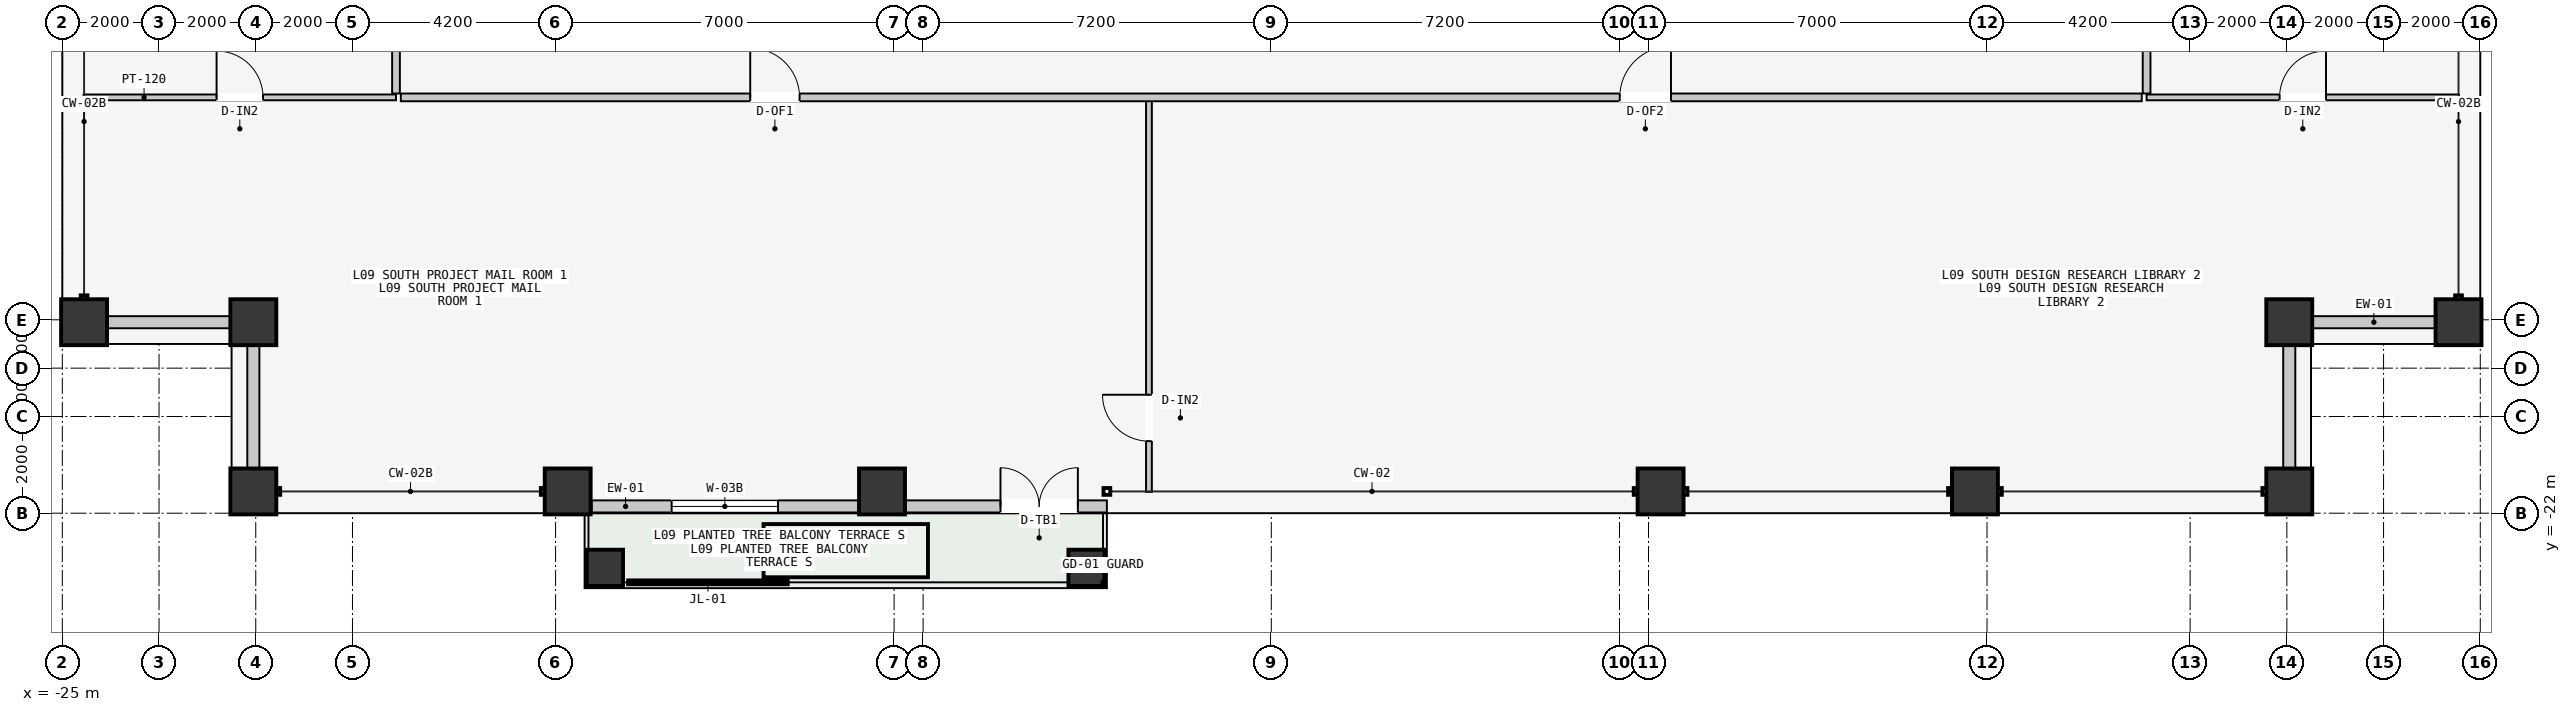
"""IFC4 building model, lengths in metres.
Left out: names, types, materials, properties, quantities, classifications, styles, units other than length and angle.
Written with IfcOpenShell. Run it as: python <this file> out.ifc"""

import sys

from ifc_helpers import new_model, si_unit, direction, frame, frame_2d, origin, origin_2d, place, context, subcontext, project, spatial, rectangle, hollow_rectangle, extrude, element, fill, save


model = new_model("IFC4")
c1 = context("Model", 3, precision=1e-05, world=origin(), true_north=direction((0.0, 1.0)))
c2 = subcontext(c1, "Body", "Model", "MODEL_VIEW")
j1 = project(units=[si_unit("LENGTHUNIT", "METRE"), si_unit("PLANEANGLEUNIT", "RADIAN")], contexts=[c1])
p1 = place(None, origin())
s1 = spatial("IfcSite", under=j1, at=p1, CompositionType="ELEMENT")
p2 = place(p1, origin())
s2 = spatial("IfcBuilding", under=s1, at=p2, CompositionType="ELEMENT")
p3 = place(p2, frame((0.0, 0.0, 38.4)))
s3 = spatial("IfcBuildingStorey", under=s2, at=p3, CompositionType="ELEMENT", Elevation=38.4)
for number, where, z_axis, x_axis in (
    (1, (-21.05, -21.55, 0.0), (0.0, 0.0, 1.0), (1.0, 0.0, 0.0)),
    (2, (-14.55, -21.55, 0.0), (0.0, 0.0, 1.0), (1.0, 0.0, 0.0)),
    (3, (-8.05, -21.55, 0.0), (0.0, 0.0, 1.0), (1.0, 0.0, 0.0)),
    (4, (8.05, -21.55, 0.0), (0.0, 0.0, 1.0), (1.0, 0.0, 0.0)),
    (5, (14.55, -21.55, 0.0), (0.0, 0.0, 1.0), (1.0, 0.0, 0.0)),
    (6, (21.05, -21.55, 0.0), (0.0, 0.0, 1.0), (1.0, 0.0, 0.0)),
    (7, (-24.55, -18.05, 0.0), (0.0, 0.0, 1.0), (0.0, 1.0, 0.0)),
    (8, (24.55, -18.05, 0.0), (0.0, 0.0, 1.0), (0.0, 1.0, 0.0)),
    (9, (21.05, -18.05, 0.0), (0.0, 0.0, 1.0), (1.0, 0.0, 0.0)),
    (10, (-21.05, -18.05, 0.0), (0.0, 0.0, 1.0), (1.0, 0.0, 0.0)),
):
    element("IfcColumn", number, at=place(p3, frame(where, z_axis=z_axis, x_axis=x_axis)), inside=s3, PredefinedType="COLUMN", context=c2, shape_type="SweptSolid", body=[
        extrude(hollow_rectangle(XDim=0.95, YDim=0.95, WallThickness=0.048, at=origin_2d()), origin(), (0.0, 0.0, 1.0), 3.6),
    ])
for number, where, z_axis, x_axis in (
    (11, (-13.78, -23.13, 0.0), (0.0, 0.0, 1.0), (1.0, 0.0, 0.0)),
    (12, (-3.82, -23.13, 0.0), (0.0, 0.0, 1.0), (1.0, 0.0, 0.0)),
):
    element("IfcColumn", number, at=place(p3, frame(where, z_axis=z_axis, x_axis=x_axis)), inside=s3, PredefinedType="COLUMN", context=c2, shape_type="SweptSolid", body=[
        extrude(hollow_rectangle(XDim=0.75, YDim=0.75, WallThickness=0.032, at=origin_2d()), origin(), (0.0, 0.0, 1.0), 3.6),
    ])
p4 = place(p3, frame((-14.055, -21.86, 0.0), z_axis=(0.0, 0.0, 1.0), x_axis=(1.0, 0.0, 0.0)))
e13 = element("IfcWall", 13, at=p4, inside=s3, PredefinedType="STANDARD", context=c2, shape_type="SweptSolid", body=[
    extrude(rectangle(XDim=5.51, YDim=0.25, at=frame_2d((2.755, 0.0))), origin(), (0.0, 0.0, 1.0), 3.4),
])
p5 = place(p4, frame((1.655, 0.0, 0.85)))
e14 = element("IfcOpeningElement", 14, at=p5, cuts=e13, PredefinedType="OPENING", context=c2, shape_type="SweptSolid", body=[
    extrude(rectangle(XDim=2.2, YDim=2.1, at=frame_2d((1.1, 1.05))), frame((0.0, 0.135, 0.0), z_axis=(0.0, -1.0, 0.0), x_axis=(1.0, 0.0, 0.0)), (0.0, 0.0, 1.0), 0.27),
])
p6 = place(p3, frame((-7.555, -21.86, 0.0), z_axis=(0.0, 0.0, 1.0), x_axis=(1.0, 0.0, 0.0)))
e15 = element("IfcWall", 15, at=p6, inside=s3, PredefinedType="STANDARD", context=c2, shape_type="SweptSolid", body=[
    extrude(rectangle(XDim=4.155, YDim=0.25, at=frame_2d((2.078, 0.0))), origin(), (0.0, 0.0, 1.0), 3.4),
])
p7 = place(p6, frame((1.955, 0.0, 0.0)))
e16 = element("IfcOpeningElement", 16, at=p7, cuts=e15, PredefinedType="OPENING", context=c2, shape_type="SweptSolid", body=[
    extrude(rectangle(XDim=1.6, YDim=2.2, at=frame_2d((0.8, 1.1))), frame((0.0, 0.135, 0.0), z_axis=(0.0, -1.0, 0.0), x_axis=(1.0, 0.0, 0.0)), (0.0, 0.0, 1.0), 0.27),
])
for number, where, z_axis, x_axis in (
    (17, (-24.065, -18.05, 0.0), (0.0, 0.0, 1.0), (1.0, 0.0, 0.0)),
    (18, (-21.05, -21.065, 0.0), (0.0, 0.0, 1.0), (0.0, 1.0, 0.0)),
    (19, (21.535, -18.05, 0.0), (0.0, 0.0, 1.0), (1.0, 0.0, 0.0)),
    (20, (21.05, -21.065, 0.0), (0.0, 0.0, 1.0), (0.0, 1.0, 0.0)),
):
    element("IfcWall", number, at=place(p3, frame(where, z_axis=z_axis, x_axis=x_axis)), inside=s3, PredefinedType="STANDARD", context=c2, shape_type="SweptSolid", body=[
        extrude(rectangle(XDim=2.53, YDim=0.25, at=frame_2d((1.265, 0.0))), origin(), (0.0, 0.0, 1.0), 2.7),
    ])
p8 = place(p3, frame((-2.53, -21.56, 0.0), z_axis=(0.0, 0.0, 1.0), x_axis=(0.0, 1.0, 0.0)))
e21 = element("IfcWall", 21, at=p8, inside=s3, PredefinedType="PARTITIONING", context=c2, shape_type="SweptSolid", body=[
    extrude(rectangle(XDim=8.1, YDim=0.12, at=frame_2d((4.05, 0.0))), origin(), (0.0, 0.0, 1.0), 3.4),
])
p9 = place(p8, frame((1.05, 0.0, 0.0)))
e22 = element("IfcOpeningElement", 22, at=p9, cuts=e21, PredefinedType="OPENING", context=c2, shape_type="SweptSolid", body=[
    extrude(rectangle(XDim=0.96, YDim=2.18, at=frame_2d((0.48, 1.09))), frame((0.0, 0.07, 0.0), z_axis=(0.0, -1.0, 0.0), x_axis=(1.0, 0.0, 0.0)), (0.0, 0.0, 1.0), 0.14),
])
p10 = place(p3, frame((-18.0, -13.4, 0.0), z_axis=(0.0, 0.0, 1.0), x_axis=(1.0, 0.0, 0.0)))
e23 = element("IfcWall", 23, at=p10, inside=s3, PredefinedType="PARTITIONING", context=c2, shape_type="SweptSolid", body=[
    extrude(rectangle(XDim=36.0, YDim=0.16, at=frame_2d((18.0, 0.0))), origin(), (0.0, 0.0, 1.0), 3.4),
])
p11 = place(p10, frame((7.225, 0.0, 0.0)))
e24 = element("IfcOpeningElement", 24, at=p11, cuts=e23, PredefinedType="OPENING", context=c2, shape_type="SweptSolid", body=[
    extrude(rectangle(XDim=1.02, YDim=2.2, at=frame_2d((0.51, 1.1))), frame((0.0, 0.09, 0.0), z_axis=(0.0, -1.0, 0.0), x_axis=(1.0, 0.0, 0.0)), (0.0, 0.0, 1.0), 0.18),
])
p12 = place(p10, frame((25.205, 0.0, 0.0)))
e25 = element("IfcOpeningElement", 25, at=p12, cuts=e23, PredefinedType="OPENING", context=c2, shape_type="SweptSolid", body=[
    extrude(rectangle(XDim=1.06, YDim=2.2, at=frame_2d((0.53, 1.1))), frame((0.0, 0.09, 0.0), z_axis=(0.0, -1.0, 0.0), x_axis=(1.0, 0.0, 0.0)), (0.0, 0.0, 1.0), 0.18),
])
p13 = place(p3, frame((-24.56, -13.4, 0.0), z_axis=(0.0, 0.0, 1.0), x_axis=(1.0, 0.0, 0.0)))
e26 = element("IfcWall", 26, at=p13, inside=s3, PredefinedType="PARTITIONING", context=c2, shape_type="SweptSolid", body=[
    extrude(rectangle(XDim=6.46, YDim=0.12, at=frame_2d((3.23, 0.0))), origin(), (0.0, 0.0, 1.0), 3.4),
])
p14 = place(p13, frame((2.75, 0.0, 0.0)))
e27 = element("IfcOpeningElement", 27, at=p14, cuts=e26, PredefinedType="OPENING", context=c2, shape_type="SweptSolid", body=[
    extrude(rectangle(XDim=0.96, YDim=2.18, at=frame_2d((0.48, 1.09))), frame((0.0, 0.07, 0.0), z_axis=(0.0, -1.0, 0.0), x_axis=(1.0, 0.0, 0.0)), (0.0, 0.0, 1.0), 0.14),
])
p15 = place(p3, frame((18.1, -13.4, 0.0), z_axis=(0.0, 0.0, 1.0), x_axis=(1.0, 0.0, 0.0)))
e28 = element("IfcWall", 28, at=p15, inside=s3, PredefinedType="PARTITIONING", context=c2, shape_type="SweptSolid", body=[
    extrude(rectangle(XDim=6.46, YDim=0.12, at=frame_2d((3.23, 0.0))), origin(), (0.0, 0.0, 1.0), 3.4),
])
p16 = place(p15, frame((2.75, 0.0, 0.0)))
e29 = element("IfcOpeningElement", 29, at=p16, cuts=e28, PredefinedType="OPENING", context=c2, shape_type="SweptSolid", body=[
    extrude(rectangle(XDim=0.96, YDim=2.18, at=frame_2d((0.48, 1.09))), frame((0.0, 0.07, 0.0), z_axis=(0.0, -1.0, 0.0), x_axis=(1.0, 0.0, 0.0)), (0.0, 0.0, 1.0), 0.14),
])
p17 = place(p3, frame((-18.1, -13.32, 0.0), z_axis=(0.0, 0.0, 1.0), x_axis=(0.0, 1.0, 0.0)))
e30 = element("IfcWall", 30, at=p17, inside=s3, PredefinedType="PARTITIONING", context=c2, shape_type="SweptSolid", body=[
    extrude(rectangle(XDim=26.64, YDim=0.16, at=frame_2d((13.32, 0.0))), origin(), (0.0, 0.0, 1.0), 3.4),
])
p18 = place(p17, frame((4.079, 0.0, 0.0)))
e31 = element("IfcOpeningElement", 31, at=p18, cuts=e30, PredefinedType="OPENING", context=c2, shape_type="SweptSolid", body=[
    extrude(rectangle(XDim=0.9, YDim=2.15, at=frame_2d((0.45, 1.075))), frame((0.0, 0.09, 0.0), z_axis=(0.0, -1.0, 0.0), x_axis=(1.0, 0.0, 0.0)), (0.0, 0.0, 1.0), 0.18),
])
p19 = place(p17, frame((17.369, 0.0, 0.0)))
e32 = element("IfcOpeningElement", 32, at=p19, cuts=e30, PredefinedType="OPENING", context=c2, shape_type="SweptSolid", body=[
    extrude(rectangle(XDim=0.96, YDim=2.18, at=frame_2d((0.48, 1.09))), frame((0.0, 0.09, 0.0), z_axis=(0.0, -1.0, 0.0), x_axis=(1.0, 0.0, 0.0)), (0.0, 0.0, 1.0), 0.18),
])
p20 = place(p3, frame((18.1, -13.32, 0.0), z_axis=(0.0, 0.0, 1.0), x_axis=(0.0, 1.0, 0.0)))
e33 = element("IfcWall", 33, at=p20, inside=s3, PredefinedType="PARTITIONING", context=c2, shape_type="SweptSolid", body=[
    extrude(rectangle(XDim=26.64, YDim=0.16, at=frame_2d((13.32, 0.0))), origin(), (0.0, 0.0, 1.0), 3.4),
])
p21 = place(p20, frame((12.87, 0.0, 0.0)))
e34 = element("IfcOpeningElement", 34, at=p21, cuts=e33, PredefinedType="OPENING", context=c2, shape_type="SweptSolid", body=[
    extrude(rectangle(XDim=0.9, YDim=2.15, at=frame_2d((0.45, 1.075))), frame((0.0, 0.09, 0.0), z_axis=(0.0, -1.0, 0.0), x_axis=(1.0, 0.0, 0.0)), (0.0, 0.0, 1.0), 0.18),
])
p22 = place(p5, origin())
e35 = element("IfcWindow", 35, at=p22, inside=s3, PartitioningType="SINGLE_PANEL", PredefinedType="WINDOW", context=c2, shape_type="SweptSolid", body=[
    extrude(rectangle(XDim=2.2, YDim=2.1, at=frame_2d((1.1, 1.05))), frame((0.0, 0.03, 0.0), z_axis=(0.0, -1.0, 0.0), x_axis=(1.0, 0.0, 0.0)), (0.0, 0.0, 1.0), 0.06),
])
fill(e14, e35)
p23 = place(p7, origin())
e36 = element("IfcDoor", 36, at=p23, inside=s3, OperationType="DOUBLE_DOOR_SINGLE_SWING", PredefinedType="DOOR", context=c2, shape_type="SweptSolid", body=[
    extrude(rectangle(XDim=1.6, YDim=2.2, at=frame_2d((0.8, 1.1))), frame((0.0, 0.025, 0.0), z_axis=(0.0, -1.0, 0.0), x_axis=(1.0, 0.0, 0.0)), (0.0, 0.0, 1.0), 0.05),
])
fill(e16, e36)
p24 = place(p9, origin())
e37 = element("IfcDoor", 37, at=p24, inside=s3, OperationType="SINGLE_SWING_RIGHT", PredefinedType="DOOR", context=c2, shape_type="SweptSolid", body=[
    extrude(rectangle(XDim=0.96, YDim=2.18, at=frame_2d((0.48, 1.09))), frame((0.0, 0.025, 0.0), z_axis=(0.0, -1.0, 0.0), x_axis=(1.0, 0.0, 0.0)), (0.0, 0.0, 1.0), 0.05),
])
fill(e22, e37)
p25 = place(p11, origin())
e38 = element("IfcDoor", 38, at=p25, inside=s3, OperationType="SINGLE_SWING_LEFT", PredefinedType="DOOR", context=c2, shape_type="SweptSolid", body=[
    extrude(rectangle(XDim=1.02, YDim=2.2, at=frame_2d((0.51, 1.1))), frame((0.0, 0.025, 0.0), z_axis=(0.0, -1.0, 0.0), x_axis=(1.0, 0.0, 0.0)), (0.0, 0.0, 1.0), 0.05),
])
fill(e24, e38)
p26 = place(p12, origin())
e39 = element("IfcDoor", 39, at=p26, inside=s3, OperationType="SINGLE_SWING_RIGHT", PredefinedType="DOOR", context=c2, shape_type="SweptSolid", body=[
    extrude(rectangle(XDim=1.06, YDim=2.2, at=frame_2d((0.53, 1.1))), frame((0.0, 0.025, 0.0), z_axis=(0.0, -1.0, 0.0), x_axis=(1.0, 0.0, 0.0)), (0.0, 0.0, 1.0), 0.05),
])
fill(e25, e39)
p27 = place(p14, origin())
e40 = element("IfcDoor", 40, at=p27, inside=s3, OperationType="SINGLE_SWING_LEFT", PredefinedType="DOOR", context=c2, shape_type="SweptSolid", body=[
    extrude(rectangle(XDim=0.96, YDim=2.18, at=frame_2d((0.48, 1.09))), frame((0.0, 0.025, 0.0), z_axis=(0.0, -1.0, 0.0), x_axis=(1.0, 0.0, 0.0)), (0.0, 0.0, 1.0), 0.05),
])
fill(e27, e40)
p28 = place(p16, origin())
e41 = element("IfcDoor", 41, at=p28, inside=s3, OperationType="SINGLE_SWING_RIGHT", PredefinedType="DOOR", context=c2, shape_type="SweptSolid", body=[
    extrude(rectangle(XDim=0.96, YDim=2.18, at=frame_2d((0.48, 1.09))), frame((0.0, 0.025, 0.0), z_axis=(0.0, -1.0, 0.0), x_axis=(1.0, 0.0, 0.0)), (0.0, 0.0, 1.0), 0.05),
])
fill(e29, e41)
save(model, sys.argv[1])
